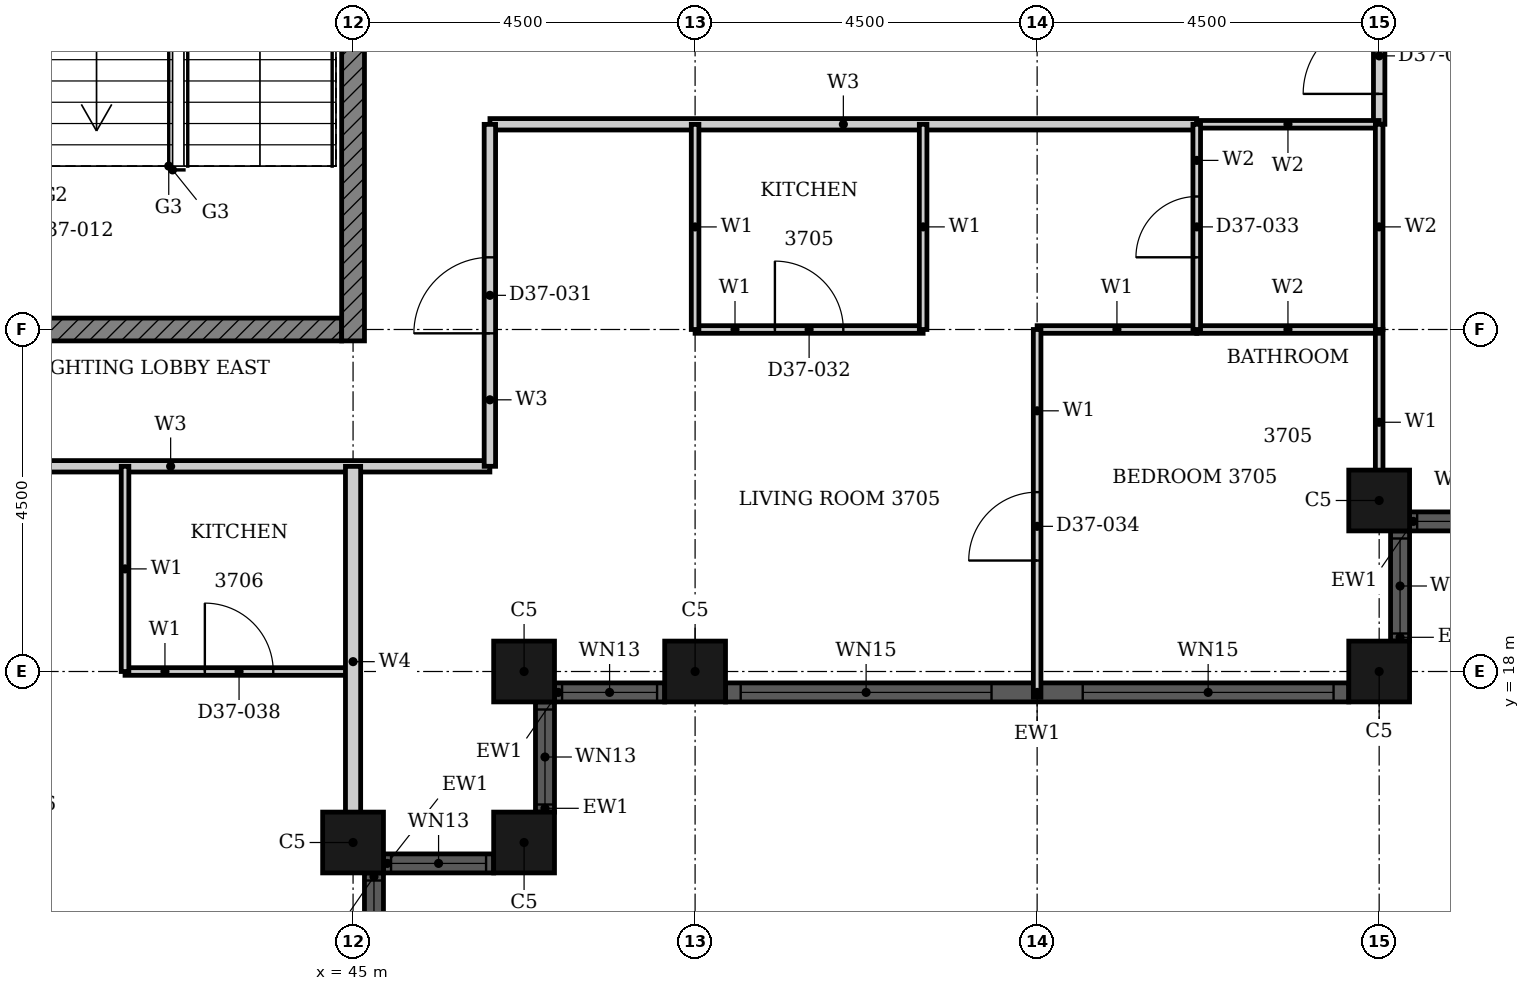
"""IFC4 building model, lengths in metres.
Left out: names, types, materials, properties, quantities, classifications, styles, units other than length and angle.
Written with IfcOpenShell. Run it as: python <this file> out.ifc"""

import sys

from ifc_helpers import new_model, si_unit, direction, frame, frame_2d, origin, origin_2d, place, context, subcontext, project, spatial, rectangle, hollow_rectangle, extrude, element, fill, save


model = new_model("IFC4")
c1 = context("Model", 3, precision=1e-05, world=origin(), true_north=direction((0.0, 1.0)))
c2 = subcontext(c1, "Body", "Model", "MODEL_VIEW")
j1 = project(units=[si_unit("LENGTHUNIT", "METRE"), si_unit("PLANEANGLEUNIT", "RADIAN")], contexts=[c1])
p1 = place(None, origin())
s1 = spatial("IfcSite", under=j1, at=p1, CompositionType="ELEMENT")
p2 = place(p1, origin())
s2 = spatial("IfcBuilding", under=s1, at=p2, CompositionType="ELEMENT")
p3 = place(p2, frame((0.0, 0.0, 150.6)))
s3 = spatial("IfcBuildingStorey", under=s2, at=p3, CompositionType="ELEMENT", Elevation=150.6)
for number, where, z_axis, x_axis in (
    (1, (45.0, 15.75, 0.0), (0.0, 0.0, 1.0), (1.0, 0.0, 0.0)),
    (2, (47.25, 15.75, 0.0), (0.0, 0.0, 1.0), (1.0, 0.0, 0.0)),
    (3, (47.25, 18.0, 0.0), (0.0, 0.0, 1.0), (1.0, 0.0, 0.0)),
    (4, (49.5, 18.0, 0.0), (0.0, 0.0, 1.0), (1.0, 0.0, 0.0)),
    (5, (58.5, 18.0, 0.0), (0.0, 0.0, 1.0), (1.0, 0.0, 0.0)),
    (6, (58.5, 20.25, 0.0), (0.0, 0.0, 1.0), (1.0, 0.0, 0.0)),
):
    element("IfcColumn", number, at=place(p3, frame(where, z_axis=z_axis, x_axis=x_axis)), inside=s3, PredefinedType="COLUMN", context=c2, shape_type="SweptSolid", body=[
        extrude(hollow_rectangle(XDim=0.8, YDim=0.8, WallThickness=0.025, at=origin_2d()), origin(), (0.0, 0.0, 1.0), 3.7),
    ])
p4 = place(p3, frame((45.275, 13.9, 0.0), z_axis=(0.0, 0.0, 1.0), x_axis=(0.0, 1.0, 0.0)))
e7 = element("IfcWall", 7, at=p4, inside=s3, PredefinedType="SOLIDWALL", context=c2, shape_type="SweptSolid", body=[
    extrude(rectangle(XDim=1.45, YDim=0.25, at=frame_2d((0.725, 0.0))), origin(), (0.0, 0.0, 1.0), 3.7),
])
p5 = place(p4, frame((0.1, 0.0, 0.9)))
e8 = element("IfcOpeningElement", 8, at=p5, cuts=e7, PredefinedType="OPENING", context=c2, shape_type="SweptSolid", body=[
    extrude(rectangle(XDim=1.25, YDim=1.85, at=frame_2d((0.625, 0.925))), frame((0.0, 0.135, 0.0), z_axis=(0.0, -1.0, 0.0), x_axis=(1.0, 0.0, 0.0)), (0.0, 0.0, 1.0), 0.27),
])
p6 = place(p3, frame((45.4, 15.475, 0.0), z_axis=(0.0, 0.0, 1.0), x_axis=(1.0, 0.0, 0.0)))
e9 = element("IfcWall", 9, at=p6, inside=s3, PredefinedType="SOLIDWALL", context=c2, shape_type="SweptSolid", body=[
    extrude(rectangle(XDim=1.45, YDim=0.25, at=frame_2d((0.725, 0.0))), origin(), (0.0, 0.0, 1.0), 3.7),
])
p7 = place(p6, frame((0.1, 0.0, 0.9)))
e10 = element("IfcOpeningElement", 10, at=p7, cuts=e9, PredefinedType="OPENING", context=c2, shape_type="SweptSolid", body=[
    extrude(rectangle(XDim=1.25, YDim=1.85, at=frame_2d((0.625, 0.925))), frame((0.0, 0.135, 0.0), z_axis=(0.0, -1.0, 0.0), x_axis=(1.0, 0.0, 0.0)), (0.0, 0.0, 1.0), 0.27),
])
p8 = place(p3, frame((47.525, 16.15, 0.0), z_axis=(0.0, 0.0, 1.0), x_axis=(0.0, 1.0, 0.0)))
e11 = element("IfcWall", 11, at=p8, inside=s3, PredefinedType="SOLIDWALL", context=c2, shape_type="SweptSolid", body=[
    extrude(rectangle(XDim=1.45, YDim=0.25, at=frame_2d((0.725, 0.0))), origin(), (0.0, 0.0, 1.0), 3.7),
])
p9 = place(p8, frame((0.1, 0.0, 0.9)))
e12 = element("IfcOpeningElement", 12, at=p9, cuts=e11, PredefinedType="OPENING", context=c2, shape_type="SweptSolid", body=[
    extrude(rectangle(XDim=1.25, YDim=1.85, at=frame_2d((0.625, 0.925))), frame((0.0, 0.135, 0.0), z_axis=(0.0, -1.0, 0.0), x_axis=(1.0, 0.0, 0.0)), (0.0, 0.0, 1.0), 0.27),
])
p10 = place(p3, frame((47.65, 17.725, 0.0), z_axis=(0.0, 0.0, 1.0), x_axis=(1.0, 0.0, 0.0)))
e13 = element("IfcWall", 13, at=p10, inside=s3, PredefinedType="SOLIDWALL", context=c2, shape_type="SweptSolid", body=[
    extrude(rectangle(XDim=1.45, YDim=0.25, at=frame_2d((0.725, 0.0))), origin(), (0.0, 0.0, 1.0), 3.7),
])
p11 = place(p10, frame((0.1, 0.0, 0.9)))
e14 = element("IfcOpeningElement", 14, at=p11, cuts=e13, PredefinedType="OPENING", context=c2, shape_type="SweptSolid", body=[
    extrude(rectangle(XDim=1.25, YDim=1.85, at=frame_2d((0.625, 0.925))), frame((0.0, 0.135, 0.0), z_axis=(0.0, -1.0, 0.0), x_axis=(1.0, 0.0, 0.0)), (0.0, 0.0, 1.0), 0.27),
])
p12 = place(p3, frame((49.9, 17.725, 0.0), z_axis=(0.0, 0.0, 1.0), x_axis=(1.0, 0.0, 0.0)))
e15 = element("IfcWall", 15, at=p12, inside=s3, PredefinedType="SOLIDWALL", context=c2, shape_type="SweptSolid", body=[
    extrude(rectangle(XDim=8.2, YDim=0.25, at=frame_2d((4.1, 0.0))), origin(), (0.0, 0.0, 1.0), 3.7),
])
p13 = place(p12, frame((0.2, 0.0, 0.45)))
e16 = element("IfcOpeningElement", 16, at=p13, cuts=e15, PredefinedType="OPENING", context=c2, shape_type="SweptSolid", body=[
    extrude(rectangle(XDim=3.3, YDim=2.3, at=frame_2d((1.65, 1.15))), frame((0.0, 0.135, 0.0), z_axis=(0.0, -1.0, 0.0), x_axis=(1.0, 0.0, 0.0)), (0.0, 0.0, 1.0), 0.27),
])
p14 = place(p12, frame((4.7, 0.0, 0.45)))
e17 = element("IfcOpeningElement", 17, at=p14, cuts=e15, PredefinedType="OPENING", context=c2, shape_type="SweptSolid", body=[
    extrude(rectangle(XDim=3.3, YDim=2.3, at=frame_2d((1.65, 1.15))), frame((0.0, 0.135, 0.0), z_axis=(0.0, -1.0, 0.0), x_axis=(1.0, 0.0, 0.0)), (0.0, 0.0, 1.0), 0.27),
])
p15 = place(p3, frame((58.775, 18.4, 0.0), z_axis=(0.0, 0.0, 1.0), x_axis=(0.0, 1.0, 0.0)))
e18 = element("IfcWall", 18, at=p15, inside=s3, PredefinedType="SOLIDWALL", context=c2, shape_type="SweptSolid", body=[
    extrude(rectangle(XDim=1.45, YDim=0.25, at=frame_2d((0.725, 0.0))), origin(), (0.0, 0.0, 1.0), 3.7),
])
p16 = place(p15, frame((0.1, 0.0, 0.9)))
e19 = element("IfcOpeningElement", 19, at=p16, cuts=e18, PredefinedType="OPENING", context=c2, shape_type="SweptSolid", body=[
    extrude(rectangle(XDim=1.25, YDim=1.85, at=frame_2d((0.625, 0.925))), frame((0.0, 0.135, 0.0), z_axis=(0.0, -1.0, 0.0), x_axis=(1.0, 0.0, 0.0)), (0.0, 0.0, 1.0), 0.27),
])
p17 = place(p3, frame((58.9, 19.975, 0.0), z_axis=(0.0, 0.0, 1.0), x_axis=(1.0, 0.0, 0.0)))
e20 = element("IfcWall", 20, at=p17, inside=s3, PredefinedType="SOLIDWALL", context=c2, shape_type="SweptSolid", body=[
    extrude(rectangle(XDim=1.45, YDim=0.25, at=frame_2d((0.725, 0.0))), origin(), (0.0, 0.0, 1.0), 3.7),
])
p18 = place(p17, frame((0.1, 0.0, 0.9)))
e21 = element("IfcOpeningElement", 21, at=p18, cuts=e20, PredefinedType="OPENING", context=c2, shape_type="SweptSolid", body=[
    extrude(rectangle(XDim=1.25, YDim=1.85, at=frame_2d((0.625, 0.925))), frame((0.0, 0.135, 0.0), z_axis=(0.0, -1.0, 0.0), x_axis=(1.0, 0.0, 0.0)), (0.0, 0.0, 1.0), 0.27),
])
p19 = place(p3, frame((32.911, 22.5, 0.0), z_axis=(0.0, 0.0, 1.0), x_axis=(1.0, 0.0, 0.0)))
e22 = element("IfcWall", 22, at=p19, inside=s3, PredefinedType="SHEAR", context=c2, shape_type="SweptSolid", body=[
    extrude(rectangle(XDim=11.939, YDim=0.3, at=frame_2d((5.97, 0.0))), origin(), (0.0, 0.0, 1.0), 3.4),
])
p20 = place(p19, frame((5.404, 0.0, 0.0)))
e23 = element("IfcOpeningElement", 23, at=p20, cuts=e22, PredefinedType="OPENING", context=c2, shape_type="SweptSolid", body=[
    extrude(rectangle(XDim=1.8, YDim=2.1, at=frame_2d((0.9, 1.05))), frame((0.0, 0.16, 0.0), z_axis=(0.0, -1.0, 0.0), x_axis=(1.0, 0.0, 0.0)), (0.0, 0.0, 1.0), 0.32),
])
p21 = place(p3, frame((45.0, 22.35, 0.0), z_axis=(0.0, 0.0, 1.0), x_axis=(0.0, 1.0, 0.0)))
e24 = element("IfcWall", 24, at=p21, inside=s3, PredefinedType="SHEAR", context=c2, shape_type="SweptSolid", body=[
    extrude(rectangle(XDim=9.3, YDim=0.3, at=frame_2d((4.65, 0.0))), origin(), (0.0, 0.0, 1.0), 3.4),
])
p22 = place(p3, frame((38.4, 20.7, 0.0), z_axis=(0.0, 0.0, 1.0), x_axis=(1.0, 0.0, 0.0)))
e25 = element("IfcWall", 25, at=p22, inside=s3, PredefinedType="PARTITIONING", context=c2, shape_type="SweptSolid", body=[
    extrude(rectangle(XDim=8.4, YDim=0.15, at=frame_2d((4.2, 0.0))), origin(), (0.0, 0.0, 1.0), 3.4),
])
p23 = place(p3, frame((46.801, 25.2, 0.0), z_axis=(0.0, 0.0, 1.0), x_axis=(1.0, 0.0, 0.0)))
e26 = element("IfcWall", 26, at=p23, inside=s3, PredefinedType="PARTITIONING", context=c2, shape_type="SweptSolid", body=[
    extrude(rectangle(XDim=9.299, YDim=0.15, at=frame_2d((4.649, 0.0))), origin(), (0.0, 0.0, 1.0), 3.4),
])
p24 = place(p3, frame((46.8, 20.7, 0.0), z_axis=(0.0, 0.0, 1.0), x_axis=(0.0, 1.0, 0.0)))
e27 = element("IfcWall", 27, at=p24, inside=s3, PredefinedType="PARTITIONING", context=c2, shape_type="SweptSolid", body=[
    extrude(rectangle(XDim=4.499, YDim=0.15, at=frame_2d((2.25, 0.0))), origin(), (0.0, 0.0, 1.0), 3.4),
])
p25 = place(p24, frame((1.75, 0.0, 0.0)))
e28 = element("IfcOpeningElement", 28, at=p25, cuts=e27, PredefinedType="OPENING", context=c2, shape_type="SweptSolid", body=[
    extrude(rectangle(XDim=1.0, YDim=2.2, at=frame_2d((0.5, 1.1))), frame((0.0, 0.085, 0.0), z_axis=(0.0, -1.0, 0.0), x_axis=(1.0, 0.0, 0.0)), (0.0, 0.0, 1.0), 0.17),
])
p26 = place(p3, frame((58.5, 25.2, 0.0), z_axis=(0.0, 0.0, 1.0), x_axis=(0.0, 1.0, 0.0)))
e29 = element("IfcWall", 29, at=p26, inside=s3, PredefinedType="PARTITIONING", context=c2, shape_type="SweptSolid", body=[
    extrude(rectangle(XDim=1.8, YDim=0.15, at=frame_2d((0.9, 0.0))), origin(), (0.0, 0.0, 1.0), 3.4),
])
p27 = place(p26, frame((0.4, 0.0, 0.0)))
e30 = element("IfcOpeningElement", 30, at=p27, cuts=e29, PredefinedType="OPENING", context=c2, shape_type="SweptSolid", body=[
    extrude(rectangle(XDim=1.0, YDim=2.1, at=frame_2d((0.5, 1.05))), frame((0.0, 0.085, 0.0), z_axis=(0.0, -1.0, 0.0), x_axis=(1.0, 0.0, 0.0)), (0.0, 0.0, 1.0), 0.17),
])
p28 = place(p3, frame((42.0, 18.0, 0.0), z_axis=(0.0, 0.0, 1.0), x_axis=(1.0, 0.0, 0.0)))
e31 = element("IfcWall", 31, at=p28, inside=s3, PredefinedType="PARTITIONING", context=c2, shape_type="SweptSolid", body=[
    extrude(rectangle(XDim=3.0, YDim=0.1, at=frame_2d((1.5, 0.0))), origin(), (0.0, 0.0, 1.0), 3.4),
])
p29 = place(p28, frame((1.05, 0.0, 0.0)))
e32 = element("IfcOpeningElement", 32, at=p29, cuts=e31, PredefinedType="OPENING", context=c2, shape_type="SweptSolid", body=[
    extrude(rectangle(XDim=0.9, YDim=2.1, at=frame_2d((0.45, 1.05))), frame((0.0, 0.06, 0.0), z_axis=(0.0, -1.0, 0.0), x_axis=(1.0, 0.0, 0.0)), (0.0, 0.0, 1.0), 0.12),
])
p30 = place(p3, frame((54.0, 22.5, 0.0), z_axis=(0.0, 0.0, 1.0), x_axis=(1.0, 0.0, 0.0)))
e33 = element("IfcWall", 33, at=p30, inside=s3, PredefinedType="PARTITIONING", context=c2, shape_type="SweptSolid", body=[
    extrude(rectangle(XDim=2.1, YDim=0.1, at=frame_2d((1.05, 0.0))), origin(), (0.0, 0.0, 1.0), 2.68),
])
p31 = place(p3, frame((49.5, 22.5, 0.0), z_axis=(0.0, 0.0, 1.0), x_axis=(1.0, 0.0, 0.0)))
e34 = element("IfcWall", 34, at=p31, inside=s3, PredefinedType="PARTITIONING", context=c2, shape_type="SweptSolid", body=[
    extrude(rectangle(XDim=3.0, YDim=0.1, at=frame_2d((1.5, 0.0))), origin(), (0.0, 0.0, 1.0), 2.68),
])
p32 = place(p31, frame((1.05, 0.0, 0.0)))
e35 = element("IfcOpeningElement", 35, at=p32, cuts=e34, PredefinedType="OPENING", context=c2, shape_type="SweptSolid", body=[
    extrude(rectangle(XDim=0.9, YDim=2.1, at=frame_2d((0.45, 1.05))), frame((0.0, 0.06, 0.0), z_axis=(0.0, -1.0, 0.0), x_axis=(1.0, 0.0, 0.0)), (0.0, 0.0, 1.0), 0.12),
])
p33 = place(p3, frame((42.0, 18.0, 0.0), z_axis=(0.0, 0.0, 1.0), x_axis=(0.0, 1.0, 0.0)))
e36 = element("IfcWall", 36, at=p33, inside=s3, PredefinedType="PARTITIONING", context=c2, shape_type="SweptSolid", body=[
    extrude(rectangle(XDim=2.7, YDim=0.1, at=frame_2d((1.35, 0.0))), origin(), (0.0, 0.0, 1.0), 3.4),
])
p34 = place(p3, frame((49.5, 22.5, 0.0), z_axis=(0.0, 0.0, 1.0), x_axis=(0.0, 1.0, 0.0)))
e37 = element("IfcWall", 37, at=p34, inside=s3, PredefinedType="PARTITIONING", context=c2, shape_type="SweptSolid", body=[
    extrude(rectangle(XDim=2.699, YDim=0.1, at=frame_2d((1.35, 0.0))), origin(), (0.0, 0.0, 1.0), 2.48),
])
p35 = place(p3, frame((52.5, 22.5, 0.0), z_axis=(0.0, 0.0, 1.0), x_axis=(0.0, 1.0, 0.0)))
e38 = element("IfcWall", 38, at=p35, inside=s3, PredefinedType="PARTITIONING", context=c2, shape_type="SweptSolid", body=[
    extrude(rectangle(XDim=2.7, YDim=0.1, at=frame_2d((1.35, 0.0))), origin(), (0.0, 0.0, 1.0), 3.4),
])
p36 = place(p3, frame((54.0, 17.66, 0.0), z_axis=(0.0, 0.0, 1.0), x_axis=(0.0, 1.0, 0.0)))
e39 = element("IfcWall", 39, at=p36, inside=s3, PredefinedType="PARTITIONING", context=c2, shape_type="SweptSolid", body=[
    extrude(rectangle(XDim=4.84, YDim=0.1, at=frame_2d((2.42, 0.0))), origin(), (0.0, 0.0, 1.0), 3.4),
])
p37 = place(p36, frame((1.8, 0.0, 0.0)))
e40 = element("IfcOpeningElement", 40, at=p37, cuts=e39, PredefinedType="OPENING", context=c2, shape_type="SweptSolid", body=[
    extrude(rectangle(XDim=0.9, YDim=2.1, at=frame_2d((0.45, 1.05))), frame((0.0, 0.06, 0.0), z_axis=(0.0, -1.0, 0.0), x_axis=(1.0, 0.0, 0.0)), (0.0, 0.0, 1.0), 0.12),
])
p38 = place(p3, frame((58.5, 20.06, 0.0), z_axis=(0.0, 0.0, 1.0), x_axis=(0.0, 1.0, 0.0)))
e41 = element("IfcWall", 41, at=p38, inside=s3, PredefinedType="PARTITIONING", context=c2, shape_type="SweptSolid", body=[
    extrude(rectangle(XDim=2.439, YDim=0.1, at=frame_2d((1.219, 0.0))), origin(), (0.0, 0.0, 1.0), 3.4),
])
p39 = place(p3, frame((45.0, 15.56, 0.0), z_axis=(0.0, 0.0, 1.0), x_axis=(0.0, 1.0, 0.0)))
e42 = element("IfcWall", 42, at=p39, inside=s3, PredefinedType="PARTITIONING", context=c2, shape_type="SweptSolid", body=[
    extrude(rectangle(XDim=5.139, YDim=0.2, at=frame_2d((2.569, 0.0))), origin(), (0.0, 0.0, 1.0), 3.4),
])
p40 = place(p3, frame((56.1, 22.5, 0.0), z_axis=(0.0, 0.0, 1.0), x_axis=(1.0, 0.0, 0.0)))
e43 = element("IfcWall", 43, at=p40, inside=s3, PredefinedType="PARTITIONING", context=c2, shape_type="SweptSolid", body=[
    extrude(rectangle(XDim=2.4, YDim=0.1, at=frame_2d((1.2, 0.0))), origin(), (0.0, 0.0, 1.0), 2.68),
])
p41 = place(p3, frame((56.1, 25.2, 0.0), z_axis=(0.0, 0.0, 1.0), x_axis=(1.0, 0.0, 0.0)))
e44 = element("IfcWall", 44, at=p41, inside=s3, PredefinedType="PARTITIONING", context=c2, shape_type="SweptSolid", body=[
    extrude(rectangle(XDim=2.4, YDim=0.1, at=frame_2d((1.2, 0.0))), origin(), (0.0, 0.0, 1.0), 3.4),
])
p42 = place(p3, frame((56.1, 22.5, 0.0), z_axis=(0.0, 0.0, 1.0), x_axis=(0.0, 1.0, 0.0)))
e45 = element("IfcWall", 45, at=p42, inside=s3, PredefinedType="PARTITIONING", context=c2, shape_type="SweptSolid", body=[
    extrude(rectangle(XDim=2.7, YDim=0.1, at=frame_2d((1.35, 0.0))), origin(), (0.0, 0.0, 1.0), 3.4),
])
p43 = place(p42, frame((0.95, 0.0, 0.0)))
e46 = element("IfcOpeningElement", 46, at=p43, cuts=e45, PredefinedType="OPENING", context=c2, shape_type="SweptSolid", body=[
    extrude(rectangle(XDim=0.8, YDim=2.1, at=frame_2d((0.4, 1.05))), frame((0.0, 0.06, 0.0), z_axis=(0.0, -1.0, 0.0), x_axis=(1.0, 0.0, 0.0)), (0.0, 0.0, 1.0), 0.12),
])
p44 = place(p3, frame((58.5, 22.5, 0.0), z_axis=(0.0, 0.0, 1.0), x_axis=(0.0, 1.0, 0.0)))
e47 = element("IfcWall", 47, at=p44, inside=s3, PredefinedType="PARTITIONING", context=c2, shape_type="SweptSolid", body=[
    extrude(rectangle(XDim=2.7, YDim=0.1, at=frame_2d((1.35, 0.0))), origin(), (0.0, 0.0, 1.0), 3.4),
])
p45 = place(p5, origin())
e48 = element("IfcWindow", 48, at=p45, inside=s3, PartitioningType="SINGLE_PANEL", PredefinedType="WINDOW", context=c2, shape_type="SweptSolid", body=[
    extrude(rectangle(XDim=1.25, YDim=1.85, at=frame_2d((0.625, 0.925))), frame((0.0, 0.03, 0.0), z_axis=(0.0, -1.0, 0.0), x_axis=(1.0, 0.0, 0.0)), (0.0, 0.0, 1.0), 0.06),
])
fill(e8, e48)
p46 = place(p7, origin())
e49 = element("IfcWindow", 49, at=p46, inside=s3, PartitioningType="SINGLE_PANEL", PredefinedType="WINDOW", context=c2, shape_type="SweptSolid", body=[
    extrude(rectangle(XDim=1.25, YDim=1.85, at=frame_2d((0.625, 0.925))), frame((0.0, 0.03, 0.0), z_axis=(0.0, -1.0, 0.0), x_axis=(1.0, 0.0, 0.0)), (0.0, 0.0, 1.0), 0.06),
])
fill(e10, e49)
p47 = place(p9, origin())
e50 = element("IfcWindow", 50, at=p47, inside=s3, PartitioningType="SINGLE_PANEL", PredefinedType="WINDOW", context=c2, shape_type="SweptSolid", body=[
    extrude(rectangle(XDim=1.25, YDim=1.85, at=frame_2d((0.625, 0.925))), frame((0.0, 0.03, 0.0), z_axis=(0.0, -1.0, 0.0), x_axis=(1.0, 0.0, 0.0)), (0.0, 0.0, 1.0), 0.06),
])
fill(e12, e50)
p48 = place(p11, origin())
e51 = element("IfcWindow", 51, at=p48, inside=s3, PartitioningType="SINGLE_PANEL", PredefinedType="WINDOW", context=c2, shape_type="SweptSolid", body=[
    extrude(rectangle(XDim=1.25, YDim=1.85, at=frame_2d((0.625, 0.925))), frame((0.0, 0.03, 0.0), z_axis=(0.0, -1.0, 0.0), x_axis=(1.0, 0.0, 0.0)), (0.0, 0.0, 1.0), 0.06),
])
fill(e14, e51)
p49 = place(p13, origin())
e52 = element("IfcWindow", 52, at=p49, inside=s3, PartitioningType="SINGLE_PANEL", PredefinedType="WINDOW", context=c2, shape_type="SweptSolid", body=[
    extrude(rectangle(XDim=3.3, YDim=2.3, at=frame_2d((1.65, 1.15))), frame((0.0, 0.03, 0.0), z_axis=(0.0, -1.0, 0.0), x_axis=(1.0, 0.0, 0.0)), (0.0, 0.0, 1.0), 0.06),
])
fill(e16, e52)
p50 = place(p14, origin())
e53 = element("IfcWindow", 53, at=p50, inside=s3, PartitioningType="SINGLE_PANEL", PredefinedType="WINDOW", context=c2, shape_type="SweptSolid", body=[
    extrude(rectangle(XDim=3.3, YDim=2.3, at=frame_2d((1.65, 1.15))), frame((0.0, 0.03, 0.0), z_axis=(0.0, -1.0, 0.0), x_axis=(1.0, 0.0, 0.0)), (0.0, 0.0, 1.0), 0.06),
])
fill(e17, e53)
p51 = place(p16, origin())
e54 = element("IfcWindow", 54, at=p51, inside=s3, PartitioningType="SINGLE_PANEL", PredefinedType="WINDOW", context=c2, shape_type="SweptSolid", body=[
    extrude(rectangle(XDim=1.25, YDim=1.85, at=frame_2d((0.625, 0.925))), frame((0.0, 0.03, 0.0), z_axis=(0.0, -1.0, 0.0), x_axis=(1.0, 0.0, 0.0)), (0.0, 0.0, 1.0), 0.06),
])
fill(e19, e54)
p52 = place(p18, origin())
e55 = element("IfcWindow", 55, at=p52, inside=s3, PartitioningType="SINGLE_PANEL", PredefinedType="WINDOW", context=c2, shape_type="SweptSolid", body=[
    extrude(rectangle(XDim=1.25, YDim=1.85, at=frame_2d((0.625, 0.925))), frame((0.0, 0.03, 0.0), z_axis=(0.0, -1.0, 0.0), x_axis=(1.0, 0.0, 0.0)), (0.0, 0.0, 1.0), 0.06),
])
fill(e21, e55)
p53 = place(p25, origin())
e56 = element("IfcDoor", 56, at=p53, inside=s3, OperationType="SINGLE_SWING_LEFT", PredefinedType="DOOR", context=c2, shape_type="SweptSolid", body=[
    extrude(rectangle(XDim=1.0, YDim=2.2, at=frame_2d((0.5, 1.1))), frame((0.0, 0.025, 0.0), z_axis=(0.0, -1.0, 0.0), x_axis=(1.0, 0.0, 0.0)), (0.0, 0.0, 1.0), 0.05),
])
fill(e28, e56)
p54 = place(p32, origin())
e57 = element("IfcDoor", 57, at=p54, inside=s3, OperationType="SINGLE_SWING_RIGHT", PredefinedType="DOOR", context=c2, shape_type="SweptSolid", body=[
    extrude(rectangle(XDim=0.9, YDim=2.1, at=frame_2d((0.45, 1.05))), frame((0.0, 0.025, 0.0), z_axis=(0.0, -1.0, 0.0), x_axis=(1.0, 0.0, 0.0)), (0.0, 0.0, 1.0), 0.05),
])
fill(e35, e57)
p55 = place(p43, origin())
e58 = element("IfcDoor", 58, at=p55, inside=s3, OperationType="SINGLE_SWING_LEFT", PredefinedType="DOOR", context=c2, shape_type="SweptSolid", body=[
    extrude(rectangle(XDim=0.8, YDim=2.1, at=frame_2d((0.4, 1.05))), frame((0.0, 0.025, 0.0), z_axis=(0.0, -1.0, 0.0), x_axis=(1.0, 0.0, 0.0)), (0.0, 0.0, 1.0), 0.05),
])
fill(e46, e58)
p56 = place(p37, origin())
e59 = element("IfcDoor", 59, at=p56, inside=s3, OperationType="SINGLE_SWING_RIGHT", PredefinedType="DOOR", context=c2, shape_type="SweptSolid", body=[
    extrude(rectangle(XDim=0.9, YDim=2.1, at=frame_2d((0.45, 1.05))), frame((0.0, 0.025, 0.0), z_axis=(0.0, -1.0, 0.0), x_axis=(1.0, 0.0, 0.0)), (0.0, 0.0, 1.0), 0.05),
])
fill(e40, e59)
p57 = place(p29, origin())
e60 = element("IfcDoor", 60, at=p57, inside=s3, OperationType="SINGLE_SWING_RIGHT", PredefinedType="DOOR", context=c2, shape_type="SweptSolid", body=[
    extrude(rectangle(XDim=0.9, YDim=2.1, at=frame_2d((0.45, 1.05))), frame((0.0, 0.025, 0.0), z_axis=(0.0, -1.0, 0.0), x_axis=(1.0, 0.0, 0.0)), (0.0, 0.0, 1.0), 0.05),
])
fill(e32, e60)
p58 = place(p27, origin())
e61 = element("IfcDoor", 61, at=p58, inside=s3, OperationType="SINGLE_SWING_LEFT", PredefinedType="DOOR", context=c2, shape_type="SweptSolid", body=[
    extrude(rectangle(XDim=1.0, YDim=2.1, at=frame_2d((0.5, 1.05))), frame((0.0, 0.025, 0.0), z_axis=(0.0, -1.0, 0.0), x_axis=(1.0, 0.0, 0.0)), (0.0, 0.0, 1.0), 0.05),
])
fill(e30, e61)
save(model, sys.argv[1])
